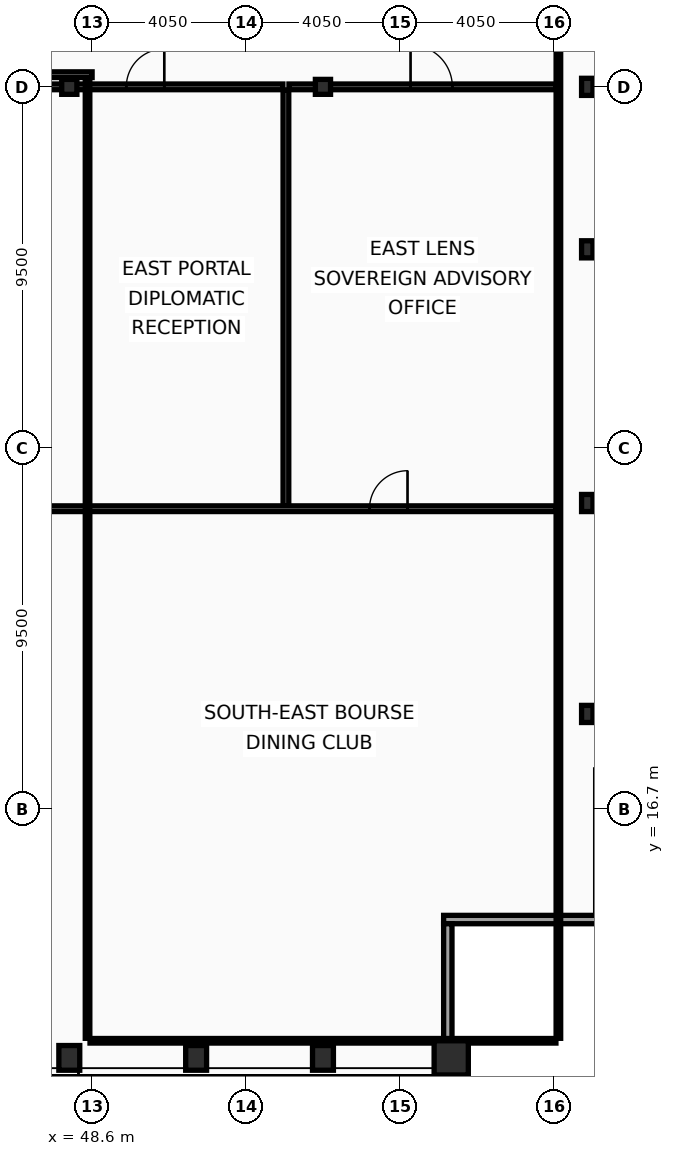
"""IFC4 building model, lengths in metres.
Left out: names, types, materials, properties, quantities, classifications, styles, units other than length and angle.
Written with IfcOpenShell. Run it as: python <this file> out.ifc"""

import sys

from ifc_helpers import new_model, si_unit, direction, frame, frame_2d, origin, origin_2d, place, context, subcontext, project, spatial, rectangle, hollow_rectangle, i_section, extrude, element, fill, save


model = new_model("IFC4")
c1 = context("Model", 3, precision=1e-05, world=origin(), true_north=direction((0.0, 1.0)))
c2 = subcontext(c1, "Body", "Model", "MODEL_VIEW")
j1 = project(units=[si_unit("LENGTHUNIT", "METRE"), si_unit("PLANEANGLEUNIT", "RADIAN")], contexts=[c1])
p1 = place(None, origin())
s1 = spatial("IfcSite", under=j1, at=p1, CompositionType="ELEMENT")
p2 = place(p1, origin())
s2 = spatial("IfcBuilding", under=s1, at=p2, CompositionType="ELEMENT")
p3 = place(p2, frame((0.0, 0.0, 305.8)))
s3 = spatial("IfcBuildingStorey", under=s2, at=p3, CompositionType="ELEMENT", Elevation=305.8)
p4 = place(p3, frame((58.05, 10.15, 0.0), z_axis=(0.0, 0.0, 1.0), x_axis=(1.0, 0.0, 0.0)))
e1 = element("IfcColumn", 1, at=p4, inside=s3, PredefinedType="COLUMN", context=c2, shape_type="SweptSolid", body=[
    extrude(hollow_rectangle(XDim=0.9, YDim=0.9, WallThickness=0.05, at=origin_2d()), origin(), (0.0, 0.0, 1.0), 4.4),
])
for number, where, z_axis, x_axis in (
    (2, (48.0, 10.15, 0.0), (0.0, 0.0, 1.0), (1.0, 0.0, 0.0)),
    (3, (51.337, 10.15, 0.0), (0.0, 0.0, 1.0), (1.0, 0.0, 0.0)),
    (4, (54.675, 10.15, 0.0), (0.0, 0.0, 1.0), (1.0, 0.0, 0.0)),
):
    element("IfcColumn", number, at=place(p3, frame(where, z_axis=z_axis, x_axis=x_axis)), inside=s3, PredefinedType="COLUMN", context=c2, shape_type="SweptSolid", body=[
        extrude(hollow_rectangle(XDim=0.55, YDim=0.65, WallThickness=0.04, at=origin_2d()), origin(), (0.0, 0.0, 1.0), 4.4),
    ])
for number, where, z_axis, x_axis in (
    (5, (61.63, 19.2, 0.0), (0.0, 0.0, 1.0), (1.0, 0.0, 0.0)),
    (6, (61.63, 24.75, 0.0), (0.0, 0.0, 1.0), (1.0, 0.0, 0.0)),
    (7, (61.63, 31.425, 0.0), (0.0, 0.0, 1.0), (1.0, 0.0, 0.0)),
    (8, (61.63, 35.7, 0.0), (0.0, 0.0, 1.0), (1.0, 0.0, 0.0)),
):
    element("IfcColumn", number, at=place(p3, frame(where, z_axis=z_axis, x_axis=x_axis)), inside=s3, PredefinedType="COLUMN", context=c2, shape_type="SweptSolid", body=[
        extrude(i_section(OverallWidth=0.3, OverallDepth=0.45, WebThickness=0.014, FlangeThickness=0.026, at=origin_2d()), origin(), (0.0, 0.0, 1.0), 4.4),
    ])
for number, where, z_axis, x_axis in (
    (9, (48.0, 35.7, 0.0), (0.0, 0.0, 1.0), (1.0, 0.0, 0.0)),
    (10, (54.675, 35.7, 0.0), (0.0, 0.0, 1.0), (1.0, 0.0, 0.0)),
):
    element("IfcColumn", number, at=place(p3, frame(where, z_axis=z_axis, x_axis=x_axis)), inside=s3, PredefinedType="COLUMN", context=c2, shape_type="SweptSolid", body=[
        extrude(i_section(OverallWidth=0.399, OverallDepth=0.393, WebThickness=0.023, FlangeThickness=0.037, at=origin_2d()), origin(), (0.0, 0.0, 1.0), 4.4),
    ])
p5 = place(p3, frame((62.07, 13.79, 0.0), z_axis=(0.0, 0.0, 1.0), x_axis=(-1.0, 0.0, 0.0)))
e11 = element("IfcWall", 11, at=p5, inside=s3, PredefinedType="SOLIDWALL", context=c2, shape_type="SweptSolid", body=[
    extrude(rectangle(XDim=4.22, YDim=0.22, at=frame_2d((2.11, 0.0))), origin(), (0.0, 0.0, 1.0), 3.68),
])
p6 = place(p3, frame((57.96, 13.68, 0.0), z_axis=(0.0, 0.0, 1.0), x_axis=(0.0, -1.0, 0.0)))
e12 = element("IfcWall", 12, at=p6, inside=s3, PredefinedType="SOLIDWALL", context=c2, shape_type="SweptSolid", body=[
    extrude(rectangle(XDim=3.91, YDim=0.22, at=frame_2d((1.955, 0.0))), origin(), (0.0, 0.0, 1.0), 3.68),
])
p7 = place(p3, frame((46.7, 35.7, 0.0), z_axis=(0.0, 0.0, 1.0), x_axis=(1.0, 0.0, 0.0)))
e13 = element("IfcWall", 13, at=p7, inside=s3, PredefinedType="PARTITIONING", context=c2, shape_type="SweptSolid", body=[
    extrude(rectangle(XDim=6.92, YDim=0.15, at=frame_2d((3.46, 0.0))), origin(), (0.0, 0.0, 1.0), 3.58),
])
p8 = place(p7, frame((2.8, 0.0, 0.0)))
e14 = element("IfcOpeningElement", 14, at=p8, cuts=e13, PredefinedType="OPENING", context=c2, shape_type="SweptSolid", body=[
    extrude(rectangle(XDim=1.0, YDim=2.05, at=frame_2d((0.5, 1.025))), frame((0.0, 0.085, 0.0), z_axis=(0.0, -1.0, 0.0), x_axis=(1.0, 0.0, 0.0)), (0.0, 0.0, 1.0), 0.17),
])
p9 = place(p3, frame((53.78, 35.7, 0.0), z_axis=(0.0, 0.0, 1.0), x_axis=(1.0, 0.0, 0.0)))
e15 = element("IfcWall", 15, at=p9, inside=s3, PredefinedType="PARTITIONING", context=c2, shape_type="SweptSolid", body=[
    extrude(rectangle(XDim=7.025, YDim=0.15, at=frame_2d((3.512, 0.0))), origin(), (0.0, 0.0, 1.0), 3.58),
])
p10 = place(p9, frame((3.2, 0.0, 0.0)))
e16 = element("IfcOpeningElement", 16, at=p10, cuts=e15, PredefinedType="OPENING", context=c2, shape_type="SweptSolid", body=[
    extrude(rectangle(XDim=1.1, YDim=2.1, at=frame_2d((0.55, 1.05))), frame((0.0, 0.085, 0.0), z_axis=(0.0, -1.0, 0.0), x_axis=(1.0, 0.0, 0.0)), (0.0, 0.0, 1.0), 0.17),
])
p11 = place(p3, frame((53.7, 24.68, 0.0), z_axis=(0.0, 0.0, 1.0), x_axis=(0.0, 1.0, 0.0)))
e17 = element("IfcWall", 17, at=p11, inside=s3, PredefinedType="PARTITIONING", context=c2, shape_type="SweptSolid", body=[
    extrude(rectangle(XDim=10.94, YDim=0.15, at=frame_2d((5.47, 0.0))), origin(), (0.0, 0.0, 1.0), 3.83),
])
p12 = place(p3, frame((46.7, 24.6, 0.0), z_axis=(0.0, 0.0, 1.0), x_axis=(1.0, 0.0, 0.0)))
e18 = element("IfcWall", 18, at=p12, inside=s3, PredefinedType="PARTITIONING", context=c2, shape_type="SweptSolid", body=[
    extrude(rectangle(XDim=14.105, YDim=0.15, at=frame_2d((7.052, 0.0))), origin(), (0.0, 0.0, 1.0), 3.58),
])
p13 = place(p12, frame((9.2, 0.0, 0.0)))
e19 = element("IfcOpeningElement", 19, at=p13, cuts=e18, PredefinedType="OPENING", context=c2, shape_type="SweptSolid", body=[
    extrude(rectangle(XDim=1.0, YDim=2.05, at=frame_2d((0.5, 1.025))), frame((0.0, 0.085, 0.0), z_axis=(0.0, -1.0, 0.0), x_axis=(1.0, 0.0, 0.0)), (0.0, 0.0, 1.0), 0.17),
])
p14 = place(p3, frame((24.3, 36.02, 0.0), z_axis=(0.0, 0.0, 1.0), x_axis=(1.0, 0.0, 0.0)))
e20 = element("IfcWall", 20, at=p14, inside=s3, PredefinedType="PARTITIONING", context=c2, shape_type="SweptSolid", body=[
    extrude(rectangle(XDim=24.3, YDim=0.15, at=frame_2d((12.15, 0.0))), origin(), (0.0, 0.0, 1.0), 3.58),
])
p15 = place(p3, frame((60.87, 10.665, 0.0), z_axis=(0.0, 0.0, 1.0), x_axis=(0.0, 1.0, 0.0)))
e21 = element("IfcWall", 21, at=p15, inside=s3, PredefinedType="PARTITIONING", context=c2, shape_type="SweptSolid", body=[
    extrude(rectangle(XDim=42.11, YDim=0.12, at=frame_2d((21.055, 0.0))), origin(), (0.0, 0.0, 1.0), 3.58),
])
p16 = place(p3, frame((48.545, 10.6, 0.0), z_axis=(0.0, 0.0, 1.0), x_axis=(1.0, 0.0, 0.0)))
e22 = element("IfcWall", 22, at=p16, inside=s3, PredefinedType="PARTITIONING", context=c2, shape_type="SweptSolid", body=[
    extrude(rectangle(XDim=12.26, YDim=0.12, at=frame_2d((6.13, 0.0))), origin(), (0.0, 0.0, 1.0), 3.58),
])
p17 = place(p3, frame((48.48, 10.665, 0.0), z_axis=(0.0, 0.0, 1.0), x_axis=(0.0, 1.0, 0.0)))
e23 = element("IfcWall", 23, at=p17, inside=s3, PredefinedType="PARTITIONING", context=c2, shape_type="SweptSolid", body=[
    extrude(rectangle(XDim=25.275, YDim=0.12, at=frame_2d((12.637, 0.0))), origin(), (0.0, 0.0, 1.0), 3.58),
])
p18 = place(p8, origin())
e24 = element("IfcDoor", 24, at=p18, inside=s3, OperationType="SINGLE_SWING_RIGHT", PredefinedType="DOOR", context=c2, shape_type="SweptSolid", body=[
    extrude(rectangle(XDim=1.0, YDim=2.05, at=frame_2d((0.5, 1.025))), frame((0.0, 0.025, 0.0), z_axis=(0.0, -1.0, 0.0), x_axis=(1.0, 0.0, 0.0)), (0.0, 0.0, 1.0), 0.05),
])
fill(e14, e24)
p19 = place(p10, origin())
e25 = element("IfcDoor", 25, at=p19, inside=s3, OperationType="SINGLE_SWING_LEFT", PredefinedType="DOOR", context=c2, shape_type="SweptSolid", body=[
    extrude(rectangle(XDim=1.1, YDim=2.1, at=frame_2d((0.55, 1.05))), frame((0.0, 0.025, 0.0), z_axis=(0.0, -1.0, 0.0), x_axis=(1.0, 0.0, 0.0)), (0.0, 0.0, 1.0), 0.05),
])
fill(e16, e25)
p20 = place(p13, origin())
e26 = element("IfcDoor", 26, at=p20, inside=s3, OperationType="SINGLE_SWING_RIGHT", PredefinedType="DOOR", context=c2, shape_type="SweptSolid", body=[
    extrude(rectangle(XDim=1.0, YDim=2.05, at=frame_2d((0.5, 1.025))), frame((0.0, 0.025, 0.0), z_axis=(0.0, -1.0, 0.0), x_axis=(1.0, 0.0, 0.0)), (0.0, 0.0, 1.0), 0.05),
])
fill(e19, e26)
save(model, sys.argv[1])
